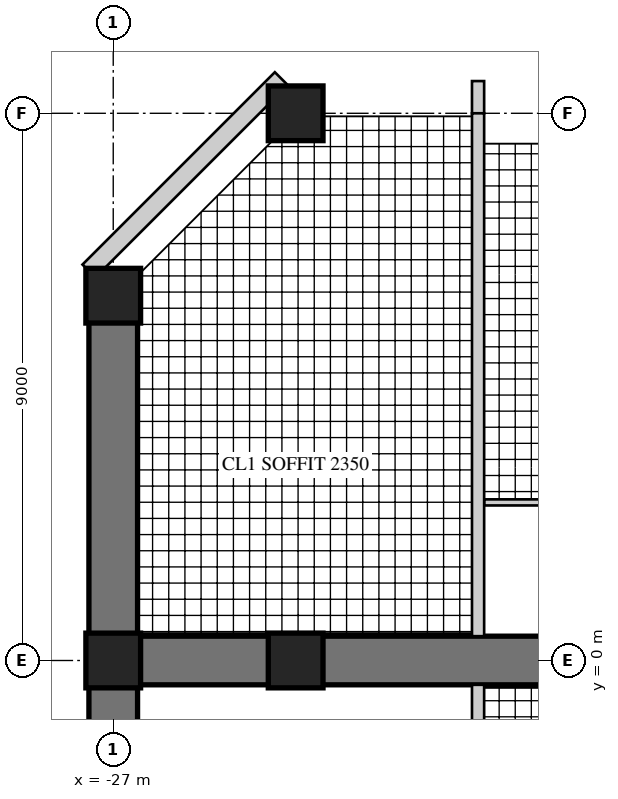
"""IFC4 building model, lengths in metres.
Left out: names, types, materials, properties, quantities, classifications, styles, units other than length and angle.
Written with IfcOpenShell. Run it as: python <this file> out.ifc"""

import sys

from ifc_helpers import new_model, si_unit, direction, frame, frame_2d, origin, origin_2d, place, context, subcontext, project, spatial, rectangle, hollow_rectangle, extrude, element, fill, save


model = new_model("IFC4")
c1 = context("Model", 3, precision=1e-05, world=origin(), true_north=direction((0.0, 1.0)))
c2 = subcontext(c1, "Body", "Model", "MODEL_VIEW")
j1 = project(units=[si_unit("LENGTHUNIT", "METRE"), si_unit("PLANEANGLEUNIT", "RADIAN")], contexts=[c1])
p1 = place(None, origin())
s1 = spatial("IfcSite", under=j1, at=p1, CompositionType="ELEMENT")
p2 = place(p1, origin())
s2 = spatial("IfcBuilding", under=s1, at=p2, CompositionType="ELEMENT")
p3 = place(p2, frame((0.0, 0.0, 206.9)))
s3 = spatial("IfcBuildingStorey", under=s2, at=p3, CompositionType="ELEMENT", Elevation=206.9)
p4 = place(p3, frame((-9.0, 0.0, 0.0), z_axis=(0.0, 0.0, 1.0), x_axis=(-1.0, 0.0, 0.0)))
e1 = element("IfcWall", 1, at=p4, inside=s3, PredefinedType="SHEAR", context=c2, shape_type="SweptSolid", body=[
    extrude(rectangle(XDim=18.0, YDim=0.8, at=frame_2d((9.0, 0.0))), origin(), (0.0, 0.0, 1.0), 3.4),
])
p5 = place(p4, frame((3.95, 0.0, 0.0)))
e2 = element("IfcOpeningElement", 2, at=p5, cuts=e1, PredefinedType="OPENING", context=c2, shape_type="SweptSolid", body=[
    extrude(rectangle(XDim=1.0, YDim=2.15, at=frame_2d((0.5, 1.075))), frame((0.0, 0.41, 0.0), z_axis=(0.0, -1.0, 0.0), x_axis=(1.0, 0.0, 0.0)), (0.0, 0.0, 1.0), 0.82),
])
p6 = place(p4, frame((6.6, 0.0, 0.0)))
e3 = element("IfcOpeningElement", 3, at=p6, cuts=e1, PredefinedType="OPENING", context=c2, shape_type="SweptSolid", body=[
    extrude(rectangle(XDim=1.0, YDim=2.15, at=frame_2d((0.5, 1.075))), frame((0.0, 0.41, 0.0), z_axis=(0.0, -1.0, 0.0), x_axis=(1.0, 0.0, 0.0)), (0.0, 0.0, 1.0), 0.82),
])
p7 = place(p4, frame((13.25, 0.0, 0.0)))
e4 = element("IfcOpeningElement", 4, at=p7, cuts=e1, PredefinedType="OPENING", context=c2, shape_type="SweptSolid", body=[
    extrude(rectangle(XDim=1.0, YDim=2.2, at=frame_2d((0.5, 1.1))), frame((0.0, 0.41, 0.0), z_axis=(0.0, -1.0, 0.0), x_axis=(1.0, 0.0, 0.0)), (0.0, 0.0, 1.0), 0.82),
])
p8 = place(p3, frame((-27.0, 6.0, 0.0), z_axis=(0.0, 0.0, 1.0), x_axis=(0.0, -1.0, 0.0)))
e5 = element("IfcWall", 5, at=p8, inside=s3, PredefinedType="SHEAR", context=c2, shape_type="SweptSolid", body=[
    extrude(rectangle(XDim=12.0, YDim=0.8, at=frame_2d((6.0, 0.0))), origin(), (0.0, 0.0, 1.0), 3.4),
])
p9 = place(p8, frame((1.625, 0.0, 0.6)))
e6 = element("IfcOpeningElement", 6, at=p9, cuts=e5, PredefinedType="OPENING", context=c2, shape_type="SweptSolid", body=[
    extrude(rectangle(XDim=3.0, YDim=2.4, at=frame_2d((1.5, 1.2))), frame((0.0, 0.41, 0.0), z_axis=(0.0, -1.0, 0.0), x_axis=(1.0, 0.0, 0.0)), (0.0, 0.0, 1.0), 0.82),
])
p10 = place(p8, frame((7.375, 0.0, 0.6)))
e7 = element("IfcOpeningElement", 7, at=p10, cuts=e5, PredefinedType="OPENING", context=c2, shape_type="SweptSolid", body=[
    extrude(rectangle(XDim=3.0, YDim=2.4, at=frame_2d((1.5, 1.2))), frame((0.0, 0.41, 0.0), z_axis=(0.0, -1.0, 0.0), x_axis=(1.0, 0.0, 0.0)), (0.0, 0.0, 1.0), 0.82),
])
for number, where, z_axis, x_axis in (
    (8, (-24.0, 9.0, 0.0), (0.0, 0.0, 1.0), (1.0, 0.0, 0.0)),
    (9, (-27.0, 6.0, 0.0), (0.0, 0.0, 1.0), (1.0, 0.0, 0.0)),
    (10, (-27.0, 0.0, 0.0), (0.0, 0.0, 1.0), (1.0, 0.0, 0.0)),
    (11, (-24.0, 0.0, 0.0), (0.0, 0.0, 1.0), (1.0, 0.0, 0.0)),
):
    element("IfcColumn", number, at=place(p3, frame(where, z_axis=z_axis, x_axis=x_axis)), inside=s3, PredefinedType="COLUMN", context=c2, shape_type="SweptSolid", body=[
        extrude(rectangle(XDim=0.9, YDim=0.9, at=origin_2d()), origin(), (0.0, 0.0, 1.0), 3.4),
    ])
p11 = place(p3, frame((-24.236, 9.57, 0.0), z_axis=(0.0, 0.0, 1.0), x_axis=(-0.707079499254, -0.707134062067, 0.0)))
e12 = element("IfcWall", 12, at=p11, inside=s3, PredefinedType="SOLIDWALL", context=c2, shape_type="SweptSolid", body=[
    extrude(rectangle(XDim=4.475, YDim=0.3, at=frame_2d((2.237, 0.0))), origin(), (0.0, 0.0, 1.0), 3.22),
])
p12 = place(p11, frame((1.787, 0.0, 0.3)))
e13 = element("IfcOpeningElement", 13, at=p12, cuts=e12, PredefinedType="OPENING", context=c2, shape_type="SweptSolid", body=[
    extrude(rectangle(XDim=0.9, YDim=2.4, at=frame_2d((0.45, 1.2))), frame((0.0, 0.16, 0.0), z_axis=(0.0, -1.0, 0.0), x_axis=(1.0, 0.0, 0.0)), (0.0, 0.0, 1.0), 0.32),
])
p13 = place(p3, frame((-18.45, 2.6, 0.0), z_axis=(0.0, 0.0, 1.0), x_axis=(-1.0, 0.0, 0.0)))
e14 = element("IfcWall", 14, at=p13, inside=s3, PredefinedType="PARTITIONING", context=c2, shape_type="SweptSolid", body=[
    extrude(rectangle(XDim=2.45, YDim=0.1, at=frame_2d((1.225, 0.0))), origin(), (0.0, 0.0, 1.0), 3.22),
])
p14 = place(p3, frame((-21.0, 9.53, 0.0), z_axis=(0.0, 0.0, 1.0), x_axis=(0.0, -1.0, 0.0)))
e15 = element("IfcWall", 15, at=p14, inside=s3, PredefinedType="SOLIDWALL", context=c2, shape_type="SweptSolid", body=[
    extrude(rectangle(XDim=0.53, YDim=0.2, at=frame_2d((0.265, 0.0))), origin(), (0.0, 0.0, 1.0), 3.22),
])
p15 = place(p3, frame((-21.0, 9.0, 0.0), z_axis=(0.0, 0.0, 1.0), x_axis=(0.0, -1.0, 0.0)))
e16 = element("IfcWall", 16, at=p15, inside=s3, PredefinedType="SOLIDWALL", context=c2, shape_type="SweptSolid", body=[
    extrude(rectangle(XDim=8.6, YDim=0.2, at=frame_2d((4.3, 0.0))), origin(), (0.0, 0.0, 1.0), 2.62),
])
p16 = place(p3, frame((-21.0, -0.4, 0.0), z_axis=(0.0, 0.0, 1.0), x_axis=(0.0, -1.0, 0.0)))
e17 = element("IfcWall", 17, at=p16, inside=s3, PredefinedType="SOLIDWALL", context=c2, shape_type="SweptSolid", body=[
    extrude(rectangle(XDim=8.6, YDim=0.2, at=frame_2d((4.3, 0.0))), origin(), (0.0, 0.0, 1.0), 2.62),
])
p17 = place(p16, frame((0.4, 0.0, 0.0)))
e18 = element("IfcOpeningElement", 18, at=p17, cuts=e17, PredefinedType="OPENING", context=c2, shape_type="SweptSolid", body=[
    extrude(rectangle(XDim=1.0, YDim=2.2, at=frame_2d((0.5, 1.1))), frame((0.0, 0.11, 0.0), z_axis=(0.0, -1.0, 0.0), x_axis=(1.0, 0.0, 0.0)), (0.0, 0.0, 1.0), 0.22),
])
p18 = place(p12, origin())
e19 = element("IfcWindow", 19, at=p18, inside=s3, PartitioningType="SINGLE_PANEL", PredefinedType="WINDOW", context=c2, shape_type="SweptSolid", body=[
    extrude(hollow_rectangle(XDim=0.9, YDim=2.4, WallThickness=0.06, at=frame_2d((0.45, 1.2))), frame((0.0, 0.03, 0.0), z_axis=(0.0, -1.0, 0.0), x_axis=(1.0, 0.0, 0.0)), (0.0, 0.0, 1.0), 0.06),
    extrude(rectangle(XDim=0.779, YDim=2.279, at=frame_2d((0.45, 1.2))), frame((0.0, 0.03, 0.0), z_axis=(0.0, -1.0, 0.0), x_axis=(1.0, 0.0, 0.0)), (0.0, 0.0, 1.0), 0.06),
])
fill(e13, e19)
p19 = place(p9, origin())
e20 = element("IfcWindow", 20, at=p19, inside=s3, PartitioningType="SINGLE_PANEL", PredefinedType="WINDOW", context=c2, shape_type="SweptSolid", body=[
    extrude(hollow_rectangle(XDim=3.0, YDim=2.4, WallThickness=0.06, at=frame_2d((1.5, 1.2))), frame((0.0, 0.03, 0.0), z_axis=(0.0, -1.0, 0.0), x_axis=(1.0, 0.0, 0.0)), (0.0, 0.0, 1.0), 0.06),
    extrude(rectangle(XDim=2.879, YDim=2.279, at=frame_2d((1.5, 1.2))), frame((0.0, 0.03, 0.0), z_axis=(0.0, -1.0, 0.0), x_axis=(1.0, 0.0, 0.0)), (0.0, 0.0, 1.0), 0.06),
])
fill(e6, e20)
p20 = place(p17, frame((1.0, 0.0, 0.0), z_axis=(0.0, 0.0, 1.0), x_axis=(-1.0, 0.0, 0.0)))
e21 = element("IfcDoor", 21, at=p20, inside=s3, OperationType="SINGLE_SWING_RIGHT", PredefinedType="DOOR", context=c2, shape_type="SweptSolid", body=[
    extrude(rectangle(XDim=1.0, YDim=2.2, at=frame_2d((0.5, 1.1))), frame((0.0, 0.025, 0.0), z_axis=(0.0, -1.0, 0.0), x_axis=(1.0, 0.0, 0.0)), (0.0, 0.0, 1.0), 0.05),
])
fill(e18, e21)
p21 = place(p7, origin())
e22 = element("IfcDoor", 22, at=p21, inside=s3, OperationType="SINGLE_SWING_LEFT", PredefinedType="DOOR", context=c2, shape_type="SweptSolid", body=[
    extrude(rectangle(XDim=1.0, YDim=2.2, at=frame_2d((0.5, 1.1))), frame((0.0, 0.025, 0.0), z_axis=(0.0, -1.0, 0.0), x_axis=(1.0, 0.0, 0.0)), (0.0, 0.0, 1.0), 0.05),
])
fill(e4, e22)
save(model, sys.argv[1])
